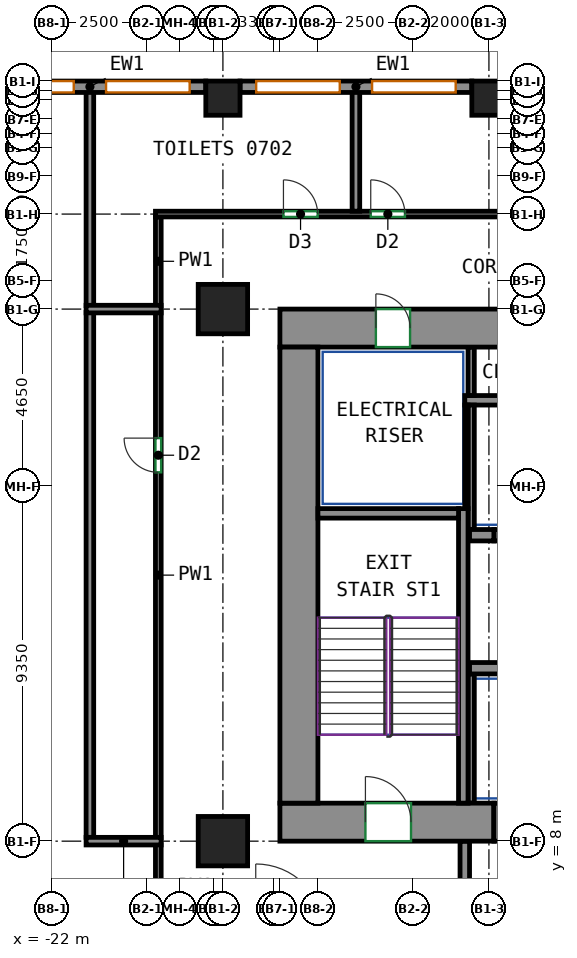
"""IFC4 building model, lengths in metres.
Left out: names, types, materials, properties, quantities, classifications, styles, units other than length and angle.
Written with IfcOpenShell. Run it as: python <this file> out.ifc"""

import sys

from ifc_helpers import new_model, si_unit, direction, frame, frame_2d, origin, origin_2d, place, context, subcontext, project, spatial, rectangle, extrude, source, transform, mapped, element, fill, save


model = new_model("IFC4")
c1 = context("Model", 3, precision=1e-05, world=origin(), true_north=direction((0.0, 1.0)))
c2 = subcontext(c1, "Body", "Model", "MODEL_VIEW")
j1 = project(units=[si_unit("LENGTHUNIT", "METRE"), si_unit("PLANEANGLEUNIT", "RADIAN")], contexts=[c1])
p1 = place(None, origin())
s1 = spatial("IfcSite", under=j1, at=p1, CompositionType="ELEMENT")
p2 = place(p1, origin())
s2 = spatial("IfcBuilding", under=s1, at=p2, CompositionType="ELEMENT")
p3 = place(p2, frame((0.0, 0.0, 35.0)))
s3 = spatial("IfcBuildingStorey", under=s2, at=p3, CompositionType="ELEMENT", Elevation=35.0)
m1 = source(origin(), c2, "Body", "SweptSolid", [
    extrude(rectangle(XDim=1.3, YDim=1.3, at=origin_2d()), origin(), (0.0, 0.0, 1.0), 3.72),
])
for number, where, z_axis, x_axis in (
    (1, (-17.5, 8.0, 0.0), (0.0, 0.0, 1.0), (1.0, 0.0, 0.0)),
    (2, (-17.5, 22.0, 0.0), (0.0, 0.0, 1.0), (1.0, 0.0, 0.0)),
):
    element("IfcColumn", number, at=place(p3, frame(where, z_axis=z_axis, x_axis=x_axis)), inside=s3, PredefinedType="COLUMN", context=c2, shape_type="MappedRepresentation", body=[
        mapped(m1, transform((0.0, 0.0, 0.0))),
    ])
m2 = source(origin(), c2, "Body", "SweptSolid", [
    extrude(rectangle(XDim=0.9, YDim=0.9, at=origin_2d()), origin(), (0.0, 0.0, 1.0), 3.72),
])
for number, where, z_axis, x_axis in (
    (3, (-17.5, 27.55, 0.0), (0.0, 0.0, 1.0), (1.0, 0.0, 0.0)),
    (4, (-10.5, 27.55, 0.0), (0.0, 0.0, 1.0), (1.0, 0.0, 0.0)),
):
    element("IfcColumn", number, at=place(p3, frame(where, z_axis=z_axis, x_axis=x_axis)), inside=s3, PredefinedType="COLUMN", context=c2, shape_type="MappedRepresentation", body=[
        mapped(m2, transform((0.0, 0.0, 0.0))),
    ])
m3 = source(origin(), c2, "Body", "SweptSolid", [
    extrude(rectangle(XDim=5.63, YDim=1.0, at=frame_2d((2.815, 0.0))), origin(), (0.0, 0.0, 1.0), 3.72),
])
p4 = place(p3, frame((-16.0, 8.5, 0.0), z_axis=(0.0, 0.0, 1.0), x_axis=(1.0, 0.0, 0.0)))
e5 = element("IfcWall", 5, at=p4, inside=s3, PredefinedType="SHEAR", context=c2, shape_type="MappedRepresentation", body=[
    mapped(m3, transform((0.0, 0.0, 0.0))),
])
p5 = place(p4, frame((2.25, 0.0, 0.0)))
e6 = element("IfcOpeningElement", 6, at=p5, cuts=e5, PredefinedType="OPENING", context=c2, shape_type="SweptSolid", body=[
    extrude(rectangle(XDim=1.2, YDim=2.1, at=frame_2d((0.6, 1.05))), frame((0.0, 0.51, 0.0), z_axis=(0.0, -1.0, 0.0), x_axis=(1.0, 0.0, 0.0)), (0.0, 0.0, 1.0), 1.02),
])
m4 = source(origin(), c2, "Body", "SweptSolid", [
    extrude(rectangle(XDim=34.1, YDim=1.0, at=frame_2d((17.05, 0.0))), origin(), (0.0, 0.0, 1.0), 3.72),
])
p6 = place(p3, frame((-16.0, 21.5, 0.0), z_axis=(0.0, 0.0, 1.0), x_axis=(1.0, 0.0, 0.0)))
e7 = element("IfcWall", 7, at=p6, inside=s3, PredefinedType="SHEAR", context=c2, shape_type="MappedRepresentation", body=[
    mapped(m4, transform((0.0, 0.0, 0.0))),
])
p7 = place(p6, frame((6.831, 0.0, 0.0)))
e8 = element("IfcOpeningElement", 8, at=p7, cuts=e7, PredefinedType="OPENING", context=c2, shape_type="SweptSolid", body=[
    extrude(rectangle(XDim=0.9, YDim=2.1, at=frame_2d((0.45, 1.05))), frame((0.0, 0.51, 0.0), z_axis=(0.0, -1.0, 0.0), x_axis=(1.0, 0.0, 0.0)), (0.0, 0.0, 1.0), 1.02),
])
p8 = place(p6, frame((12.138, 0.0, 0.0)))
e9 = element("IfcOpeningElement", 9, at=p8, cuts=e7, PredefinedType="OPENING", context=c2, shape_type="SweptSolid", body=[
    extrude(rectangle(XDim=0.9, YDim=2.1, at=frame_2d((0.45, 1.05))), frame((0.0, 0.51, 0.0), z_axis=(0.0, -1.0, 0.0), x_axis=(1.0, 0.0, 0.0)), (0.0, 0.0, 1.0), 1.02),
])
p9 = place(p6, frame((17.565, 0.0, 0.0)))
e10 = element("IfcOpeningElement", 10, at=p9, cuts=e7, PredefinedType="OPENING", context=c2, shape_type="SweptSolid", body=[
    extrude(rectangle(XDim=0.9, YDim=2.1, at=frame_2d((0.45, 1.05))), frame((0.0, 0.51, 0.0), z_axis=(0.0, -1.0, 0.0), x_axis=(1.0, 0.0, 0.0)), (0.0, 0.0, 1.0), 1.02),
])
p10 = place(p6, frame((21.786, 0.0, 0.0)))
e11 = element("IfcOpeningElement", 11, at=p10, cuts=e7, PredefinedType="OPENING", context=c2, shape_type="SweptSolid", body=[
    extrude(rectangle(XDim=0.9, YDim=2.1, at=frame_2d((0.45, 1.05))), frame((0.0, 0.51, 0.0), z_axis=(0.0, -1.0, 0.0), x_axis=(1.0, 0.0, 0.0)), (0.0, 0.0, 1.0), 1.02),
])
p11 = place(p6, frame((26.127, 0.0, 0.0)))
e12 = element("IfcOpeningElement", 12, at=p11, cuts=e7, PredefinedType="OPENING", context=c2, shape_type="SweptSolid", body=[
    extrude(rectangle(XDim=0.9, YDim=2.1, at=frame_2d((0.45, 1.05))), frame((0.0, 0.51, 0.0), z_axis=(0.0, -1.0, 0.0), x_axis=(1.0, 0.0, 0.0)), (0.0, 0.0, 1.0), 1.02),
])
p12 = place(p6, frame((2.525, 0.0, 0.0)))
e13 = element("IfcOpeningElement", 13, at=p12, cuts=e7, PredefinedType="OPENING", context=c2, shape_type="SweptSolid", body=[
    extrude(rectangle(XDim=0.9, YDim=2.1, at=frame_2d((0.45, 1.05))), frame((0.0, 0.51, 0.0), z_axis=(0.0, -1.0, 0.0), x_axis=(1.0, 0.0, 0.0)), (0.0, 0.0, 1.0), 1.02),
])
p13 = place(p6, frame((30.675, 0.0, 0.0)))
e14 = element("IfcOpeningElement", 14, at=p13, cuts=e7, PredefinedType="OPENING", context=c2, shape_type="SweptSolid", body=[
    extrude(rectangle(XDim=0.9, YDim=2.1, at=frame_2d((0.45, 1.05))), frame((0.0, 0.51, 0.0), z_axis=(0.0, -1.0, 0.0), x_axis=(1.0, 0.0, 0.0)), (0.0, 0.0, 1.0), 1.02),
])
m5 = source(origin(), c2, "Body", "SweptSolid", [
    extrude(rectangle(XDim=12.0, YDim=1.0, at=frame_2d((6.0, 0.0))), origin(), (0.0, 0.0, 1.0), 3.72),
])
p14 = place(p3, frame((-15.5, 9.0, 0.0), z_axis=(0.0, 0.0, 1.0), x_axis=(0.0, 1.0, 0.0)))
e15 = element("IfcWall", 15, at=p14, inside=s3, PredefinedType="SHEAR", context=c2, shape_type="MappedRepresentation", body=[
    mapped(m5, transform((0.0, 0.0, 0.0))),
])
m6 = source(origin(), c2, "Body", "SweptSolid", [
    extrude(rectangle(XDim=7.75, YDim=0.25, at=frame_2d((3.875, 0.0))), origin(), (0.0, 0.0, 1.0), 3.72),
])
p15 = place(p3, frame((-11.175, 9.0, 0.0), z_axis=(0.0, 0.0, 1.0), x_axis=(0.0, 1.0, 0.0)))
e16 = element("IfcWall", 16, at=p15, inside=s3, PredefinedType="SHEAR", context=c2, shape_type="MappedRepresentation", body=[
    mapped(m6, transform((0.0, 0.0, 0.0))),
])
m7 = source(origin(), c2, "Body", "SweptSolid", [
    extrude(rectangle(XDim=3.7, YDim=0.25, at=frame_2d((1.85, 0.0))), origin(), (0.0, 0.0, 1.0), 3.72),
])
p16 = place(p3, frame((-15.0, 16.625, 0.0), z_axis=(0.0, 0.0, 1.0), x_axis=(1.0, 0.0, 0.0)))
e17 = element("IfcWall", 17, at=p16, inside=s3, PredefinedType="SHEAR", context=c2, shape_type="MappedRepresentation", body=[
    mapped(m7, transform((0.0, 0.0, 0.0))),
])
m8 = source(origin(), c2, "Body", "SweptSolid", [
    extrude(rectangle(XDim=6.0, YDim=0.3, at=frame_2d((3.0, 0.0))), origin(), (0.0, 0.0, 1.0), 3.72),
])
p17 = place(p3, frame((-11.01, 12.55, 0.0), z_axis=(0.0, 0.0, 1.0), x_axis=(1.0, 0.0, 0.0)))
e18 = element("IfcWall", 18, at=p17, inside=s3, PredefinedType="SHEAR", context=c2, shape_type="MappedRepresentation", body=[
    mapped(m8, transform((0.0, 0.0, 0.0))),
])
m9 = source(origin(), c2, "Body", "SweptSolid", [
    extrude(rectangle(XDim=0.64, YDim=0.3, at=frame_2d((0.32, 0.0))), origin(), (0.0, 0.0, 1.0), 3.72),
])
p18 = place(p3, frame((-11.01, 16.05, 0.0), z_axis=(0.0, 0.0, 1.0), x_axis=(1.0, 0.0, 0.0)))
e19 = element("IfcWall", 19, at=p18, inside=s3, PredefinedType="SHEAR", context=c2, shape_type="MappedRepresentation", body=[
    mapped(m9, transform((0.0, 0.0, 0.0))),
])
m10 = source(origin(), c2, "Body", "SweptSolid", [
    extrude(rectangle(XDim=6.1, YDim=0.3, at=frame_2d((3.05, 0.0))), origin(), (0.0, 0.0, 1.0), 3.72),
])
p19 = place(p3, frame((-10.95, 27.85, 0.0), z_axis=(0.0, 0.0, 1.0), x_axis=(-1.0, 0.0, 0.0)))
e20 = element("IfcWall", 20, at=p19, inside=s3, PredefinedType="SOLIDWALL", context=c2, shape_type="MappedRepresentation", body=[
    mapped(m10, transform((0.0, 0.0, 0.0))),
])
p20 = place(p19, frame((0.425, 0.0, 0.7)))
e21 = element("IfcOpeningElement", 21, at=p20, cuts=e20, PredefinedType="OPENING", context=c2, shape_type="SweptSolid", body=[
    extrude(rectangle(XDim=2.2, YDim=2.25, at=frame_2d((1.1, 1.125))), frame((0.0, 0.16, 0.0), z_axis=(0.0, -1.0, 0.0), x_axis=(1.0, 0.0, 0.0)), (0.0, 0.0, 1.0), 0.32),
])
p21 = place(p19, frame((3.475, 0.0, 0.7)))
e22 = element("IfcOpeningElement", 22, at=p21, cuts=e20, PredefinedType="OPENING", context=c2, shape_type="SweptSolid", body=[
    extrude(rectangle(XDim=2.2, YDim=2.25, at=frame_2d((1.1, 1.125))), frame((0.0, 0.16, 0.0), z_axis=(0.0, -1.0, 0.0), x_axis=(1.0, 0.0, 0.0)), (0.0, 0.0, 1.0), 0.32),
])
p22 = place(p3, frame((-17.95, 27.85, 0.0), z_axis=(0.0, 0.0, 1.0), x_axis=(-1.0, 0.0, 0.0)))
e23 = element("IfcWall", 23, at=p22, inside=s3, PredefinedType="SOLIDWALL", context=c2, shape_type="MappedRepresentation", body=[
    mapped(m10, transform((0.0, 0.0, 0.0))),
])
p23 = place(p22, frame((0.425, 0.0, 0.7)))
e24 = element("IfcOpeningElement", 24, at=p23, cuts=e23, PredefinedType="OPENING", context=c2, shape_type="SweptSolid", body=[
    extrude(rectangle(XDim=2.2, YDim=2.25, at=frame_2d((1.1, 1.125))), frame((0.0, 0.16, 0.0), z_axis=(0.0, -1.0, 0.0), x_axis=(1.0, 0.0, 0.0)), (0.0, 0.0, 1.0), 0.32),
])
p24 = place(p22, frame((3.475, 0.0, 0.7)))
e25 = element("IfcOpeningElement", 25, at=p24, cuts=e23, PredefinedType="OPENING", context=c2, shape_type="SweptSolid", body=[
    extrude(rectangle(XDim=2.2, YDim=2.25, at=frame_2d((1.1, 1.125))), frame((0.0, 0.16, 0.0), z_axis=(0.0, -1.0, 0.0), x_axis=(1.0, 0.0, 0.0)), (0.0, 0.0, 1.0), 0.32),
])
m11 = source(origin(), c2, "Body", "SweptSolid", [
    extrude(rectangle(XDim=1.4, YDim=0.3, at=frame_2d((0.7, 0.0))), origin(), (0.0, 0.0, 1.0), 3.72),
])
p25 = place(p3, frame((-10.37, 16.05, 0.0), z_axis=(0.0, 0.0, 1.0), x_axis=(1.0, 0.0, 0.0)))
e26 = element("IfcWall", 26, at=p25, inside=s3, PredefinedType="PARTITIONING", context=c2, shape_type="MappedRepresentation", body=[
    mapped(m11, transform((0.0, 0.0, 0.0))),
])
p26 = place(p25, frame((0.15, 0.0, 0.0)))
e27 = element("IfcOpeningElement", 27, at=p26, cuts=e26, PredefinedType="OPENING", context=c2, shape_type="SweptSolid", body=[
    extrude(rectangle(XDim=1.1, YDim=2.1, at=frame_2d((0.55, 1.05))), frame((0.0, 0.16, 0.0), z_axis=(0.0, -1.0, 0.0), x_axis=(1.0, 0.0, 0.0)), (0.0, 0.0, 1.0), 0.32),
])
m12 = source(origin(), c2, "Body", "SweptSolid", [
    extrude(rectangle(XDim=2.65, YDim=0.25, at=frame_2d((1.325, 0.0))), origin(), (0.0, 0.0, 1.0), 3.72),
])
p27 = place(p3, frame((-11.135, 5.35, 0.0), z_axis=(0.0, 0.0, 1.0), x_axis=(0.0, 1.0, 0.0)))
e28 = element("IfcWall", 28, at=p27, inside=s3, PredefinedType="PARTITIONING", context=c2, shape_type="MappedRepresentation", body=[
    mapped(m12, transform((0.0, 0.0, 0.0))),
])
m13 = source(origin(), c2, "Body", "SweptSolid", [
    extrude(rectangle(XDim=24.37, YDim=0.25, at=frame_2d((12.185, 0.0))), origin(), (0.0, 0.0, 1.0), 3.72),
])
p28 = place(p3, frame((-11.135, 19.6, 0.0), z_axis=(0.0, 0.0, 1.0), x_axis=(1.0, 0.0, 0.0)))
e29 = element("IfcWall", 29, at=p28, inside=s3, PredefinedType="PARTITIONING", context=c2, shape_type="MappedRepresentation", body=[
    mapped(m13, transform((0.0, 0.0, 0.0))),
])
m14 = source(origin(), c2, "Body", "SweptSolid", [
    extrude(rectangle(XDim=3.275, YDim=0.165, at=frame_2d((1.638, 0.0))), origin(), (0.0, 0.0, 1.0), 3.72),
])
p29 = place(p3, frame((-10.968, 16.2, 0.0), z_axis=(0.0, 0.0, 1.0), x_axis=(0.0, 1.0, 0.0)))
e30 = element("IfcWall", 30, at=p29, inside=s3, PredefinedType="PARTITIONING", context=c2, shape_type="MappedRepresentation", body=[
    mapped(m14, transform((0.0, 0.0, 0.0))),
])
m15 = source(origin(), c2, "Body", "SweptSolid", [
    extrude(rectangle(XDim=1.275, YDim=0.165, at=frame_2d((0.637, 0.0))), origin(), (0.0, 0.0, 1.0), 3.72),
])
p30 = place(p3, frame((-10.968, 19.725, 0.0), z_axis=(0.0, 0.0, 1.0), x_axis=(0.0, 1.0, 0.0)))
e31 = element("IfcWall", 31, at=p30, inside=s3, PredefinedType="PARTITIONING", context=c2, shape_type="MappedRepresentation", body=[
    mapped(m15, transform((0.0, 0.0, 0.0))),
])
m16 = source(origin(), c2, "Body", "SweptSolid", [
    extrude(rectangle(XDim=2.725, YDim=0.085, at=frame_2d((1.363, 0.0))), origin(), (0.0, 0.0, 1.0), 3.72),
])
p31 = place(p3, frame((-11.093, 16.75, 0.0), z_axis=(0.0, 0.0, 1.0), x_axis=(0.0, 1.0, 0.0)))
e32 = element("IfcWall", 32, at=p31, inside=s3, PredefinedType="PARTITIONING", context=c2, shape_type="MappedRepresentation", body=[
    mapped(m16, transform((0.0, 0.0, 0.0))),
])
m17 = source(origin(), c2, "Body", "SweptSolid", [
    extrude(rectangle(XDim=3.4, YDim=0.165, at=frame_2d((1.7, 0.0))), origin(), (0.0, 0.0, 1.0), 3.72),
])
p32 = place(p3, frame((-10.968, 9.0, 0.0), z_axis=(0.0, 0.0, 1.0), x_axis=(0.0, 1.0, 0.0)))
e33 = element("IfcWall", 33, at=p32, inside=s3, PredefinedType="PARTITIONING", context=c2, shape_type="MappedRepresentation", body=[
    mapped(m17, transform((0.0, 0.0, 0.0))),
])
m18 = source(origin(), c2, "Body", "SweptSolid", [
    extrude(rectangle(XDim=1.4, YDim=1.0, at=frame_2d((0.7, 0.0))), origin(), (0.0, 0.0, 1.0), 2.7),
])
p33 = place(p3, frame((-10.37, 8.5, 0.0), z_axis=(0.0, 0.0, 1.0), x_axis=(1.0, 0.0, 0.0)))
e34 = element("IfcWall", 34, at=p33, inside=s3, PredefinedType="PARTITIONING", context=c2, shape_type="MappedRepresentation", body=[
    mapped(m18, transform((0.0, 0.0, 0.0))),
])
p34 = place(p33, frame((0.25, 0.0, 0.0)))
e35 = element("IfcOpeningElement", 35, at=p34, cuts=e34, PredefinedType="OPENING", context=c2, shape_type="SweptSolid", body=[
    extrude(rectangle(XDim=0.9, YDim=2.1, at=frame_2d((0.45, 1.05))), frame((0.0, 0.51, 0.0), z_axis=(0.0, -1.0, 0.0), x_axis=(1.0, 0.0, 0.0)), (0.0, 0.0, 1.0), 1.02),
])
p35 = place(p3, frame((-19.2, 5.675, 0.0), z_axis=(0.0, 0.0, 1.0), x_axis=(0.0, 1.0, 0.0)))
e36 = element("IfcWall", 36, at=p35, inside=s3, PredefinedType="PARTITIONING", context=c2, shape_type="SweptSolid", body=[
    extrude(rectangle(XDim=2.235, YDim=0.15, at=frame_2d((1.117, 0.0))), origin(), (0.0, 0.0, 1.0), 3.72),
])
p36 = place(p3, frame((-19.2, 22.09, 0.0), z_axis=(0.0, 0.0, 1.0), x_axis=(0.0, 1.0, 0.0)))
e37 = element("IfcWall", 37, at=p36, inside=s3, PredefinedType="PARTITIONING", context=c2, shape_type="SweptSolid", body=[
    extrude(rectangle(XDim=2.335, YDim=0.15, at=frame_2d((1.167, 0.0))), origin(), (0.0, 0.0, 1.0), 3.72),
])
p37 = place(p3, frame((-19.275, 24.5, 0.0), z_axis=(0.0, 0.0, 1.0), x_axis=(1.0, 0.0, 0.0)))
e38 = element("IfcWall", 38, at=p37, inside=s3, PredefinedType="PARTITIONING", context=c2, shape_type="SweptSolid", body=[
    extrude(rectangle(XDim=40.35, YDim=0.15, at=frame_2d((20.175, 0.0))), origin(), (0.0, 0.0, 1.0), 3.07),
])
p38 = place(p37, frame((3.368, 0.0, 0.0)))
e39 = element("IfcOpeningElement", 39, at=p38, cuts=e38, PredefinedType="OPENING", context=c2, shape_type="SweptSolid", body=[
    extrude(rectangle(XDim=0.9, YDim=2.1, at=frame_2d((0.45, 1.05))), frame((0.0, 0.085, 0.0), z_axis=(0.0, -1.0, 0.0), x_axis=(1.0, 0.0, 0.0)), (0.0, 0.0, 1.0), 0.17),
])
p39 = place(p37, frame((5.665, 0.0, 0.0)))
e40 = element("IfcOpeningElement", 40, at=p39, cuts=e38, PredefinedType="OPENING", context=c2, shape_type="SweptSolid", body=[
    extrude(rectangle(XDim=0.9, YDim=2.1, at=frame_2d((0.45, 1.05))), frame((0.0, 0.085, 0.0), z_axis=(0.0, -1.0, 0.0), x_axis=(1.0, 0.0, 0.0)), (0.0, 0.0, 1.0), 0.17),
])
p40 = place(p37, frame((38.544, 0.0, 0.0)))
e41 = element("IfcOpeningElement", 41, at=p40, cuts=e38, PredefinedType="OPENING", context=c2, shape_type="SweptSolid", body=[
    extrude(rectangle(XDim=1.0, YDim=2.1, at=frame_2d((0.5, 1.05))), frame((0.0, 0.085, 0.0), z_axis=(0.0, -1.0, 0.0), x_axis=(1.0, 0.0, 0.0)), (0.0, 0.0, 1.0), 0.17),
])
p41 = place(p3, frame((-19.2, 8.09, 0.0), z_axis=(0.0, 0.0, 1.0), x_axis=(0.0, 1.0, 0.0)))
e42 = element("IfcWall", 42, at=p41, inside=s3, PredefinedType="PARTITIONING", context=c2, shape_type="SweptSolid", body=[
    extrude(rectangle(XDim=13.82, YDim=0.15, at=frame_2d((6.91, 0.0))), origin(), (0.0, 0.0, 1.0), 3.72),
])
p42 = place(p41, frame((9.615, 0.0, 0.0)))
e43 = element("IfcOpeningElement", 43, at=p42, cuts=e42, PredefinedType="OPENING", context=c2, shape_type="SweptSolid", body=[
    extrude(rectangle(XDim=0.9, YDim=2.1, at=frame_2d((0.45, 1.05))), frame((0.0, 0.085, 0.0), z_axis=(0.0, -1.0, 0.0), x_axis=(1.0, 0.0, 0.0)), (0.0, 0.0, 1.0), 0.17),
])
p43 = place(p3, frame((-21.0, 22.09, 0.0), z_axis=(0.0, 0.0, 1.0), x_axis=(0.0, 1.0, 0.0)))
e44 = element("IfcWall", 44, at=p43, inside=s3, PredefinedType="PARTITIONING", context=c2, shape_type="SweptSolid", body=[
    extrude(rectangle(XDim=5.66, YDim=0.2, at=frame_2d((2.83, 0.0))), origin(), (0.0, 0.0, 1.0), 3.72),
])
p44 = place(p3, frame((-21.0, 8.1, 0.0), z_axis=(0.0, 0.0, 1.0), x_axis=(0.0, 1.0, 0.0)))
e45 = element("IfcWall", 45, at=p44, inside=s3, PredefinedType="PARTITIONING", context=c2, shape_type="SweptSolid", body=[
    extrude(rectangle(XDim=13.81, YDim=0.2, at=frame_2d((6.905, 0.0))), origin(), (0.0, 0.0, 1.0), 3.72),
])
p45 = place(p3, frame((-21.1, 8.0, 0.0), z_axis=(0.0, 0.0, 1.0), x_axis=(1.0, 0.0, 0.0)))
e46 = element("IfcWall", 46, at=p45, inside=s3, PredefinedType="PARTITIONING", context=c2, shape_type="SweptSolid", body=[
    extrude(rectangle(XDim=1.974, YDim=0.2, at=frame_2d((0.987, 0.0))), origin(), (0.0, 0.0, 1.0), 3.07),
])
p46 = place(p3, frame((-14.0, 24.576, 0.0), z_axis=(0.0, 0.0, 1.0), x_axis=(0.0, 1.0, 0.0)))
e47 = element("IfcWall", 47, at=p46, inside=s3, PredefinedType="PARTITIONING", context=c2, shape_type="SweptSolid", body=[
    extrude(rectangle(XDim=3.174, YDim=0.2, at=frame_2d((1.587, 0.0))), origin(), (0.0, 0.0, 1.0), 3.72),
])
p47 = place(p3, frame((-21.1, 22.0, 0.0), z_axis=(0.0, 0.0, 1.0), x_axis=(1.0, 0.0, 0.0)))
e48 = element("IfcWall", 48, at=p47, inside=s3, PredefinedType="PARTITIONING", context=c2, shape_type="SweptSolid", body=[
    extrude(rectangle(XDim=1.974, YDim=0.2, at=frame_2d((0.987, 0.0))), origin(), (0.0, 0.0, 1.0), 3.72),
])
p48 = place(p20, origin())
e49 = element("IfcWindow", 49, at=p48, inside=s3, PartitioningType="SINGLE_PANEL", PredefinedType="WINDOW", context=c2, shape_type="SweptSolid", body=[
    extrude(rectangle(XDim=2.2, YDim=2.25, at=frame_2d((1.1, 1.125))), frame((0.0, 0.03, 0.0), z_axis=(0.0, -1.0, 0.0), x_axis=(1.0, 0.0, 0.0)), (0.0, 0.0, 1.0), 0.06),
])
fill(e21, e49)
p49 = place(p21, origin())
e50 = element("IfcWindow", 50, at=p49, inside=s3, PartitioningType="SINGLE_PANEL", PredefinedType="WINDOW", context=c2, shape_type="SweptSolid", body=[
    extrude(rectangle(XDim=2.2, YDim=2.25, at=frame_2d((1.1, 1.125))), frame((0.0, 0.03, 0.0), z_axis=(0.0, -1.0, 0.0), x_axis=(1.0, 0.0, 0.0)), (0.0, 0.0, 1.0), 0.06),
])
fill(e22, e50)
p50 = place(p23, origin())
e51 = element("IfcWindow", 51, at=p50, inside=s3, PartitioningType="SINGLE_PANEL", PredefinedType="WINDOW", context=c2, shape_type="SweptSolid", body=[
    extrude(rectangle(XDim=2.2, YDim=2.25, at=frame_2d((1.1, 1.125))), frame((0.0, 0.03, 0.0), z_axis=(0.0, -1.0, 0.0), x_axis=(1.0, 0.0, 0.0)), (0.0, 0.0, 1.0), 0.06),
])
fill(e24, e51)
p51 = place(p24, origin())
e52 = element("IfcWindow", 52, at=p51, inside=s3, PartitioningType="SINGLE_PANEL", PredefinedType="WINDOW", context=c2, shape_type="SweptSolid", body=[
    extrude(rectangle(XDim=2.2, YDim=2.25, at=frame_2d((1.1, 1.125))), frame((0.0, 0.03, 0.0), z_axis=(0.0, -1.0, 0.0), x_axis=(1.0, 0.0, 0.0)), (0.0, 0.0, 1.0), 0.06),
])
fill(e25, e52)
p52 = place(p12, origin())
e53 = element("IfcDoor", 53, at=p52, inside=s3, OperationType="SINGLE_SWING_LEFT", PredefinedType="DOOR", context=c2, shape_type="SweptSolid", body=[
    extrude(rectangle(XDim=0.9, YDim=2.1, at=frame_2d((0.45, 1.05))), frame((0.0, -0.355, 0.0), z_axis=(0.0, -1.0, 0.0), x_axis=(1.0, 0.0, 0.0)), (0.0, 0.0, 1.0), 0.05),
])
fill(e13, e53)
p53 = place(p5, origin())
e54 = element("IfcDoor", 54, at=p53, inside=s3, OperationType="DOUBLE_DOOR_SINGLE_SWING", PredefinedType="DOOR", context=c2, shape_type="SweptSolid", body=[
    extrude(rectangle(XDim=1.2, YDim=2.1, at=frame_2d((0.6, 1.05))), frame((0.0, 0.405, 0.0), z_axis=(0.0, -1.0, 0.0), x_axis=(1.0, 0.0, 0.0)), (0.0, 0.0, 1.0), 0.05),
])
fill(e6, e54)
p54 = place(p42, origin())
e55 = element("IfcDoor", 55, at=p54, inside=s3, OperationType="SINGLE_SWING_RIGHT", PredefinedType="DOOR", context=c2, shape_type="SweptSolid", body=[
    extrude(rectangle(XDim=0.9, YDim=2.1, at=frame_2d((0.45, 1.05))), frame((0.0, 0.025, 0.0), z_axis=(0.0, -1.0, 0.0), x_axis=(1.0, 0.0, 0.0)), (0.0, 0.0, 1.0), 0.05),
])
fill(e43, e55)
p55 = place(p38, origin())
e56 = element("IfcDoor", 56, at=p55, inside=s3, OperationType="SINGLE_SWING_LEFT", PredefinedType="DOOR", context=c2, shape_type="SweptSolid", body=[
    extrude(rectangle(XDim=0.9, YDim=2.1, at=frame_2d((0.45, 1.05))), frame((0.0, 0.025, 0.0), z_axis=(0.0, -1.0, 0.0), x_axis=(1.0, 0.0, 0.0)), (0.0, 0.0, 1.0), 0.05),
])
fill(e39, e56)
p56 = place(p39, origin())
e57 = element("IfcDoor", 57, at=p56, inside=s3, OperationType="SINGLE_SWING_LEFT", PredefinedType="DOOR", context=c2, shape_type="SweptSolid", body=[
    extrude(rectangle(XDim=0.9, YDim=2.1, at=frame_2d((0.45, 1.05))), frame((0.0, 0.025, 0.0), z_axis=(0.0, -1.0, 0.0), x_axis=(1.0, 0.0, 0.0)), (0.0, 0.0, 1.0), 0.05),
])
fill(e40, e57)
save(model, sys.argv[1])
